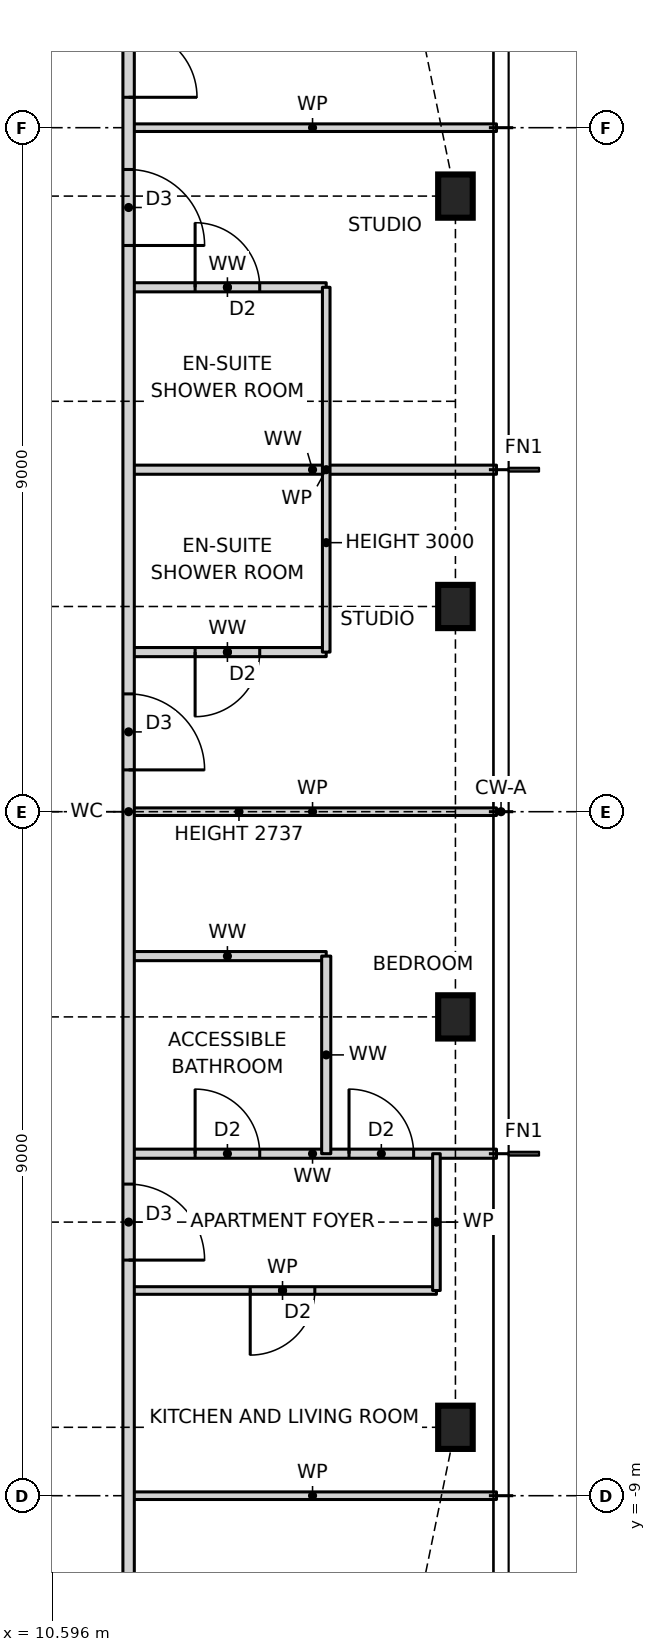
"""IFC4 building model, lengths in metres.
Left out: names, types, materials, properties, quantities, classifications, styles, units other than length and angle.
Written with IfcOpenShell. Run it as: python <this file> out.ifc"""

import sys

from ifc_helpers import new_model, si_unit, direction, frame, frame_2d, origin, origin_2d, place, context, subcontext, project, spatial, rectangle, i_section, extrude, element, fill, save


model = new_model("IFC4")
c1 = context("Model", 3, precision=1e-05, world=origin(), true_north=direction((0.0, 1.0)))
c2 = subcontext(c1, "Body", "Model", "MODEL_VIEW")
j1 = project(units=[si_unit("LENGTHUNIT", "METRE"), si_unit("PLANEANGLEUNIT", "RADIAN")], contexts=[c1])
p1 = place(None, origin())
s1 = spatial("IfcSite", under=j1, at=p1, CompositionType="ELEMENT")
p2 = place(p1, origin())
s2 = spatial("IfcBuilding", under=s1, at=p2, CompositionType="ELEMENT")
p3 = place(p2, frame((0.0, 0.0, 218.5)))
s3 = spatial("IfcBuildingStorey", under=s2, at=p3, CompositionType="ELEMENT", Elevation=218.5)
for number, where, z_axis, x_axis in (
    (1, (15.9, -8.1, 0.0), (0.0, 0.0, 1.0), (1.0, 0.0, 0.0)),
    (2, (15.9, -2.7, 0.0), (0.0, 0.0, 1.0), (1.0, 0.0, 0.0)),
    (3, (15.9, 2.7, 0.0), (0.0, 0.0, 1.0), (1.0, 0.0, 0.0)),
    (4, (15.9, 8.1, 0.0), (0.0, 0.0, 1.0), (1.0, 0.0, 0.0)),
):
    element("IfcColumn", number, at=place(p3, frame(where, z_axis=z_axis, x_axis=x_axis)), inside=s3, PredefinedType="COLUMN", context=c2, shape_type="SweptSolid", body=[
        extrude(i_section(OverallWidth=0.455, OverallDepth=0.569, WebThickness=0.078, FlangeThickness=0.125, at=origin_2d()), origin(), (0.0, 0.0, 1.0), 3.5),
    ])
p4 = place(p3, frame((11.6, -9.0, 0.0), z_axis=(0.0, 0.0, 1.0), x_axis=(1.0, 0.0, 0.0)))
e5 = element("IfcWall", 5, at=p4, inside=s3, PredefinedType="PARTITIONING", context=c2, shape_type="SweptSolid", body=[
    extrude(rectangle(XDim=4.84, YDim=0.1, at=frame_2d((2.42, 0.0))), origin(), (0.0, 0.0, 1.0), 3.27),
])
p5 = place(p3, frame((11.6, -6.3, 0.0), z_axis=(0.0, 0.0, 1.0), x_axis=(1.0, 0.0, 0.0)))
e6 = element("IfcWall", 6, at=p5, inside=s3, PredefinedType="PARTITIONING", context=c2, shape_type="SweptSolid", body=[
    extrude(rectangle(XDim=4.05, YDim=0.1, at=frame_2d((2.025, 0.0))), origin(), (0.0, 0.0, 1.0), 3.27),
])
p6 = place(p5, frame((1.6, 0.0, 0.0)))
e7 = element("IfcOpeningElement", 7, at=p6, cuts=e6, PredefinedType="OPENING", context=c2, shape_type="SweptSolid", body=[
    extrude(rectangle(XDim=0.85, YDim=2.1, at=frame_2d((0.425, 1.05))), frame((0.0, 0.06, 0.0), z_axis=(0.0, -1.0, 0.0), x_axis=(1.0, 0.0, 0.0)), (0.0, 0.0, 1.0), 0.12),
])
p7 = place(p3, frame((11.6, -4.5, 0.0), z_axis=(0.0, 0.0, 1.0), x_axis=(1.0, 0.0, 0.0)))
e8 = element("IfcWall", 8, at=p7, inside=s3, PredefinedType="PARTITIONING", context=c2, shape_type="SweptSolid", body=[
    extrude(rectangle(XDim=4.84, YDim=0.12, at=frame_2d((2.42, 0.0))), origin(), (0.0, 0.0, 1.0), 3.27),
])
p8 = place(p7, frame((2.9, 0.0, 0.0)))
e9 = element("IfcOpeningElement", 9, at=p8, cuts=e8, PredefinedType="OPENING", context=c2, shape_type="SweptSolid", body=[
    extrude(rectangle(XDim=0.85, YDim=2.1, at=frame_2d((0.425, 1.05))), frame((0.0, 0.07, 0.0), z_axis=(0.0, -1.0, 0.0), x_axis=(1.0, 0.0, 0.0)), (0.0, 0.0, 1.0), 0.14),
])
p9 = place(p7, frame((0.875, 0.0, 0.0)))
e10 = element("IfcOpeningElement", 10, at=p9, cuts=e8, PredefinedType="OPENING", context=c2, shape_type="SweptSolid", body=[
    extrude(rectangle(XDim=0.85, YDim=2.1, at=frame_2d((0.425, 1.05))), frame((0.0, 0.07, 0.0), z_axis=(0.0, -1.0, 0.0), x_axis=(1.0, 0.0, 0.0)), (0.0, 0.0, 1.0), 0.14),
])
p10 = place(p3, frame((11.6, -1.9, 0.0), z_axis=(0.0, 0.0, 1.0), x_axis=(1.0, 0.0, 0.0)))
e11 = element("IfcWall", 11, at=p10, inside=s3, PredefinedType="PARTITIONING", context=c2, shape_type="SweptSolid", body=[
    extrude(rectangle(XDim=2.6, YDim=0.12, at=frame_2d((1.3, 0.0))), origin(), (0.0, 0.0, 1.0), 3.27),
])
p11 = place(p3, frame((11.6, 0.0, 0.0), z_axis=(0.0, 0.0, 1.0), x_axis=(1.0, 0.0, 0.0)))
e12 = element("IfcWall", 12, at=p11, inside=s3, PredefinedType="PARTITIONING", context=c2, shape_type="SweptSolid", body=[
    extrude(rectangle(XDim=4.84, YDim=0.1, at=frame_2d((2.42, 0.0))), origin(), (0.0, 0.0, 1.0), 2.737),
])
p12 = place(p3, frame((11.6, 2.1, 0.0), z_axis=(0.0, 0.0, 1.0), x_axis=(1.0, 0.0, 0.0)))
e13 = element("IfcWall", 13, at=p12, inside=s3, PredefinedType="PARTITIONING", context=c2, shape_type="SweptSolid", body=[
    extrude(rectangle(XDim=2.6, YDim=0.12, at=frame_2d((1.3, 0.0))), origin(), (0.0, 0.0, 1.0), 3.27),
])
p13 = place(p12, frame((0.875, 0.0, 0.0)))
e14 = element("IfcOpeningElement", 14, at=p13, cuts=e13, PredefinedType="OPENING", context=c2, shape_type="SweptSolid", body=[
    extrude(rectangle(XDim=0.85, YDim=2.1, at=frame_2d((0.425, 1.05))), frame((0.0, 0.07, 0.0), z_axis=(0.0, -1.0, 0.0), x_axis=(1.0, 0.0, 0.0)), (0.0, 0.0, 1.0), 0.14),
])
p14 = place(p3, frame((11.6, 4.5, 0.0), z_axis=(0.0, 0.0, 1.0), x_axis=(1.0, 0.0, 0.0)))
e15 = element("IfcWall", 15, at=p14, inside=s3, PredefinedType="PARTITIONING", context=c2, shape_type="SweptSolid", body=[
    extrude(rectangle(XDim=4.84, YDim=0.12, at=frame_2d((2.42, 0.0))), origin(), (0.0, 0.0, 1.0), 3.27),
])
p15 = place(p3, frame((11.6, 6.9, 0.0), z_axis=(0.0, 0.0, 1.0), x_axis=(1.0, 0.0, 0.0)))
e16 = element("IfcWall", 16, at=p15, inside=s3, PredefinedType="PARTITIONING", context=c2, shape_type="SweptSolid", body=[
    extrude(rectangle(XDim=2.6, YDim=0.12, at=frame_2d((1.3, 0.0))), origin(), (0.0, 0.0, 1.0), 3.27),
])
p16 = place(p15, frame((0.875, 0.0, 0.0)))
e17 = element("IfcOpeningElement", 17, at=p16, cuts=e16, PredefinedType="OPENING", context=c2, shape_type="SweptSolid", body=[
    extrude(rectangle(XDim=0.85, YDim=2.1, at=frame_2d((0.425, 1.05))), frame((0.0, 0.07, 0.0), z_axis=(0.0, -1.0, 0.0), x_axis=(1.0, 0.0, 0.0)), (0.0, 0.0, 1.0), 0.14),
])
p17 = place(p3, frame((11.6, 9.0, 0.0), z_axis=(0.0, 0.0, 1.0), x_axis=(1.0, 0.0, 0.0)))
e18 = element("IfcWall", 18, at=p17, inside=s3, PredefinedType="PARTITIONING", context=c2, shape_type="SweptSolid", body=[
    extrude(rectangle(XDim=4.84, YDim=0.1, at=frame_2d((2.42, 0.0))), origin(), (0.0, 0.0, 1.0), 3.27),
])
p18 = place(p3, frame((15.65, -6.3, 0.0), z_axis=(0.0, 0.0, 1.0), x_axis=(0.0, 1.0, 0.0)))
e19 = element("IfcWall", 19, at=p18, inside=s3, PredefinedType="PARTITIONING", context=c2, shape_type="SweptSolid", body=[
    extrude(rectangle(XDim=1.8, YDim=0.1, at=frame_2d((0.9, 0.0))), origin(), (0.0, 0.0, 1.0), 3.27),
])
p19 = place(p3, frame((14.2, -4.5, 0.0), z_axis=(0.0, 0.0, 1.0), x_axis=(0.0, 1.0, 0.0)))
e20 = element("IfcWall", 20, at=p19, inside=s3, PredefinedType="PARTITIONING", context=c2, shape_type="SweptSolid", body=[
    extrude(rectangle(XDim=2.6, YDim=0.12, at=frame_2d((1.3, 0.0))), origin(), (0.0, 0.0, 1.0), 3.27),
])
p20 = place(p3, frame((14.2, 2.1, 0.0), z_axis=(0.0, 0.0, 1.0), x_axis=(0.0, 1.0, 0.0)))
e21 = element("IfcWall", 21, at=p20, inside=s3, PredefinedType="PARTITIONING", context=c2, shape_type="SweptSolid", body=[
    extrude(rectangle(XDim=4.8, YDim=0.1, at=frame_2d((2.4, 0.0))), origin(), (0.0, 0.0, 1.0), 3.0),
])
p21 = place(p3, frame((11.6, -11.6, 0.0), z_axis=(0.0, 0.0, 1.0), x_axis=(0.0, 1.0, 0.0)))
e22 = element("IfcWall", 22, at=p21, inside=s3, PredefinedType="PARTITIONING", context=c2, shape_type="SweptSolid", body=[
    extrude(rectangle(XDim=23.2, YDim=0.15, at=frame_2d((11.6, 0.0))), origin(), (0.0, 0.0, 1.0), 3.27),
])
p22 = place(p21, frame((5.7, 0.0, 0.0)))
e23 = element("IfcOpeningElement", 23, at=p22, cuts=e22, PredefinedType="OPENING", context=c2, shape_type="SweptSolid", body=[
    extrude(rectangle(XDim=1.0, YDim=2.1, at=frame_2d((0.5, 1.05))), frame((0.0, 0.085, 0.0), z_axis=(0.0, -1.0, 0.0), x_axis=(1.0, 0.0, 0.0)), (0.0, 0.0, 1.0), 0.17),
])
p23 = place(p21, frame((12.15, 0.0, 0.0)))
e24 = element("IfcOpeningElement", 24, at=p23, cuts=e22, PredefinedType="OPENING", context=c2, shape_type="SweptSolid", body=[
    extrude(rectangle(XDim=1.0, YDim=2.1, at=frame_2d((0.5, 1.05))), frame((0.0, 0.085, 0.0), z_axis=(0.0, -1.0, 0.0), x_axis=(1.0, 0.0, 0.0)), (0.0, 0.0, 1.0), 0.17),
])
p24 = place(p21, frame((19.05, 0.0, 0.0)))
e25 = element("IfcOpeningElement", 25, at=p24, cuts=e22, PredefinedType="OPENING", context=c2, shape_type="SweptSolid", body=[
    extrude(rectangle(XDim=1.0, YDim=2.1, at=frame_2d((0.5, 1.05))), frame((0.0, 0.085, 0.0), z_axis=(0.0, -1.0, 0.0), x_axis=(1.0, 0.0, 0.0)), (0.0, 0.0, 1.0), 0.17),
])
p25 = place(p21, frame((21.0, 0.0, 0.0)))
e26 = element("IfcOpeningElement", 26, at=p25, cuts=e22, PredefinedType="OPENING", context=c2, shape_type="SweptSolid", body=[
    extrude(rectangle(XDim=1.8, YDim=2.1, at=frame_2d((0.9, 1.05))), frame((0.0, 0.085, 0.0), z_axis=(0.0, -1.0, 0.0), x_axis=(1.0, 0.0, 0.0)), (0.0, 0.0, 1.0), 0.17),
])
p26 = place(p22, frame((1.0, 0.0, 0.0), z_axis=(0.0, 0.0, 1.0), x_axis=(-1.0, 0.0, 0.0)))
e27 = element("IfcDoor", 27, at=p26, inside=s3, OperationType="SINGLE_SWING_RIGHT", PredefinedType="DOOR", context=c2, shape_type="SweptSolid", body=[
    extrude(rectangle(XDim=1.0, YDim=2.1, at=frame_2d((0.5, 1.05))), frame((0.0, 0.025, 0.0), z_axis=(0.0, -1.0, 0.0), x_axis=(1.0, 0.0, 0.0)), (0.0, 0.0, 1.0), 0.05),
])
fill(e23, e27)
p27 = place(p6, frame((0.85, 0.0, 0.0), z_axis=(0.0, 0.0, 1.0), x_axis=(-1.0, 0.0, 0.0)))
e28 = element("IfcDoor", 28, at=p27, inside=s3, OperationType="SINGLE_SWING_RIGHT", PredefinedType="DOOR", context=c2, shape_type="SweptSolid", body=[
    extrude(rectangle(XDim=0.85, YDim=2.1, at=frame_2d((0.425, 1.05))), frame((0.0, 0.025, 0.0), z_axis=(0.0, -1.0, 0.0), x_axis=(1.0, 0.0, 0.0)), (0.0, 0.0, 1.0), 0.05),
])
fill(e7, e28)
p28 = place(p8, origin())
e29 = element("IfcDoor", 29, at=p28, inside=s3, OperationType="SINGLE_SWING_LEFT", PredefinedType="DOOR", context=c2, shape_type="SweptSolid", body=[
    extrude(rectangle(XDim=0.85, YDim=2.1, at=frame_2d((0.425, 1.05))), frame((0.0, 0.025, 0.0), z_axis=(0.0, -1.0, 0.0), x_axis=(1.0, 0.0, 0.0)), (0.0, 0.0, 1.0), 0.05),
])
fill(e9, e29)
p29 = place(p9, origin())
e30 = element("IfcDoor", 30, at=p29, inside=s3, OperationType="SINGLE_SWING_LEFT", PredefinedType="DOOR", context=c2, shape_type="SweptSolid", body=[
    extrude(rectangle(XDim=0.85, YDim=2.1, at=frame_2d((0.425, 1.05))), frame((0.0, 0.025, 0.0), z_axis=(0.0, -1.0, 0.0), x_axis=(1.0, 0.0, 0.0)), (0.0, 0.0, 1.0), 0.05),
])
fill(e10, e30)
p30 = place(p23, frame((1.0, 0.0, 0.0), z_axis=(0.0, 0.0, 1.0), x_axis=(-1.0, 0.0, 0.0)))
e31 = element("IfcDoor", 31, at=p30, inside=s3, OperationType="SINGLE_SWING_RIGHT", PredefinedType="DOOR", context=c2, shape_type="SweptSolid", body=[
    extrude(rectangle(XDim=1.0, YDim=2.1, at=frame_2d((0.5, 1.05))), frame((0.0, 0.025, 0.0), z_axis=(0.0, -1.0, 0.0), x_axis=(1.0, 0.0, 0.0)), (0.0, 0.0, 1.0), 0.05),
])
fill(e24, e31)
p31 = place(p13, frame((0.85, 0.0, 0.0), z_axis=(0.0, 0.0, 1.0), x_axis=(-1.0, 0.0, 0.0)))
e32 = element("IfcDoor", 32, at=p31, inside=s3, OperationType="SINGLE_SWING_RIGHT", PredefinedType="DOOR", context=c2, shape_type="SweptSolid", body=[
    extrude(rectangle(XDim=0.85, YDim=2.1, at=frame_2d((0.425, 1.05))), frame((0.0, 0.025, 0.0), z_axis=(0.0, -1.0, 0.0), x_axis=(1.0, 0.0, 0.0)), (0.0, 0.0, 1.0), 0.05),
])
fill(e14, e32)
p32 = place(p24, frame((1.0, 0.0, 0.0), z_axis=(0.0, 0.0, 1.0), x_axis=(-1.0, 0.0, 0.0)))
e33 = element("IfcDoor", 33, at=p32, inside=s3, OperationType="SINGLE_SWING_RIGHT", PredefinedType="DOOR", context=c2, shape_type="SweptSolid", body=[
    extrude(rectangle(XDim=1.0, YDim=2.1, at=frame_2d((0.5, 1.05))), frame((0.0, 0.025, 0.0), z_axis=(0.0, -1.0, 0.0), x_axis=(1.0, 0.0, 0.0)), (0.0, 0.0, 1.0), 0.05),
])
fill(e25, e33)
p33 = place(p16, origin())
e34 = element("IfcDoor", 34, at=p33, inside=s3, OperationType="SINGLE_SWING_LEFT", PredefinedType="DOOR", context=c2, shape_type="SweptSolid", body=[
    extrude(rectangle(XDim=0.85, YDim=2.1, at=frame_2d((0.425, 1.05))), frame((0.0, 0.025, 0.0), z_axis=(0.0, -1.0, 0.0), x_axis=(1.0, 0.0, 0.0)), (0.0, 0.0, 1.0), 0.05),
])
fill(e17, e34)
p34 = place(p25, frame((1.8, 0.0, 0.0), z_axis=(0.0, 0.0, 1.0), x_axis=(-1.0, 0.0, 0.0)))
e35 = element("IfcDoor", 35, at=p34, inside=s3, OperationType="DOUBLE_DOOR_SINGLE_SWING", PredefinedType="DOOR", context=c2, shape_type="SweptSolid", body=[
    extrude(rectangle(XDim=1.8, YDim=2.1, at=frame_2d((0.9, 1.05))), frame((0.0, 0.025, 0.0), z_axis=(0.0, -1.0, 0.0), x_axis=(1.0, 0.0, 0.0)), (0.0, 0.0, 1.0), 0.05),
])
fill(e26, e35)
save(model, sys.argv[1])
